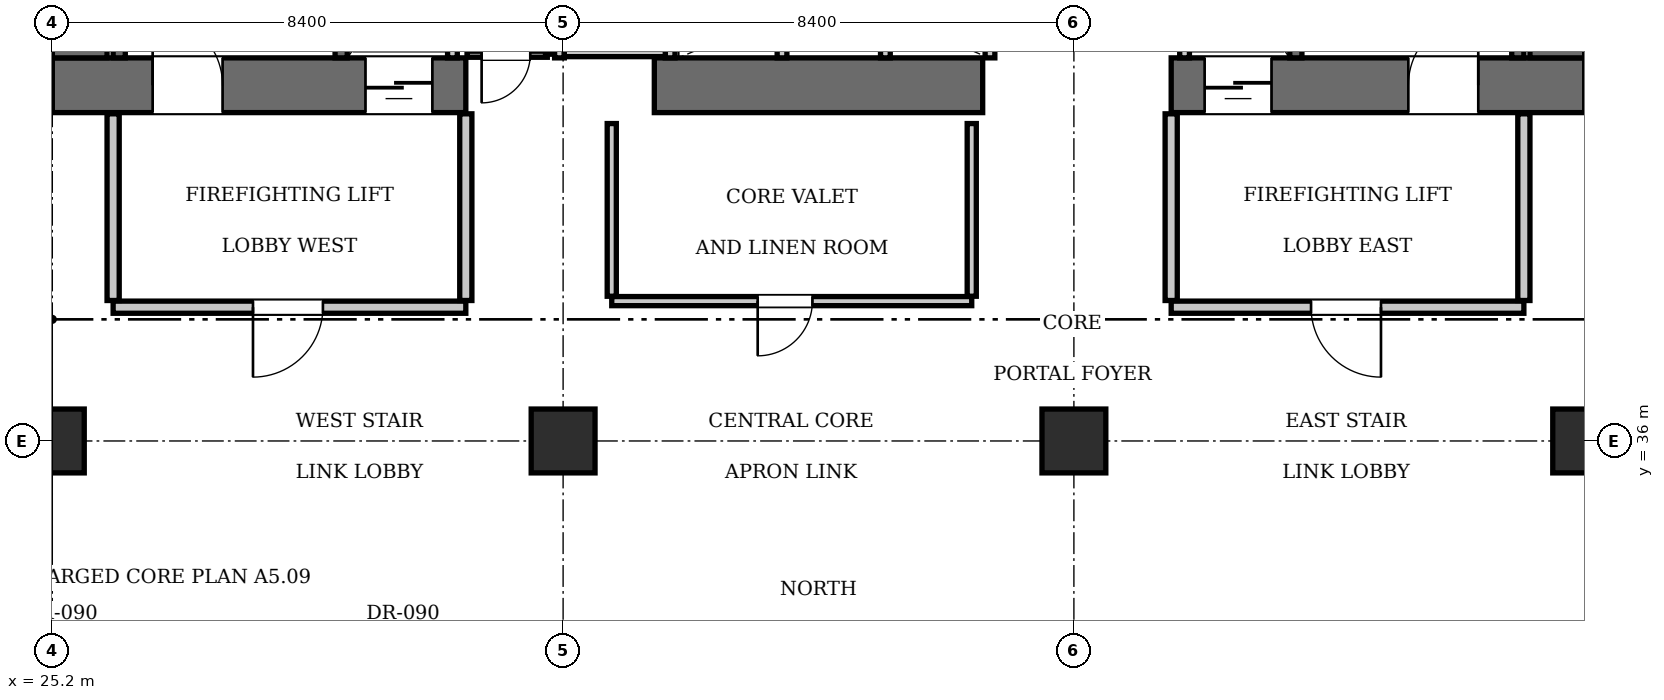
"""IFC4 building model, lengths in metres.
Left out: names, types, materials, properties, quantities, classifications, styles, units other than length and angle.
Written with IfcOpenShell. Run it as: python <this file> out.ifc"""

import sys

from ifc_helpers import new_model, si_unit, direction, frame, frame_2d, origin, origin_2d, place, context, subcontext, project, spatial, rectangle, extrude, element, fill, save


model = new_model("IFC4")
c1 = context("Model", 3, precision=1e-05, world=origin(), true_north=direction((0.0, 1.0)))
c2 = subcontext(c1, "Body", "Model", "MODEL_VIEW")
j1 = project(units=[si_unit("LENGTHUNIT", "METRE"), si_unit("PLANEANGLEUNIT", "RADIAN")], contexts=[c1])
p1 = place(None, origin())
s1 = spatial("IfcSite", under=j1, at=p1, CompositionType="ELEMENT")
p2 = place(p1, origin())
s2 = spatial("IfcBuilding", under=s1, at=p2, CompositionType="ELEMENT")
p3 = place(p2, frame((0.0, 0.0, 88.55)))
s3 = spatial("IfcBuildingStorey", under=s2, at=p3, CompositionType="ELEMENT", Elevation=88.55)
p4 = place(p3, frame((25.2, 41.85, 0.0), z_axis=(0.0, 0.0, 1.0), x_axis=(1.0, 0.0, 0.0)))
e1 = element("IfcWall", 1, at=p4, inside=s3, PredefinedType="SHEAR", context=c2, shape_type="SweptSolid", body=[
    extrude(rectangle(XDim=6.8, YDim=0.9, at=frame_2d((3.4, 0.0))), origin(), (0.0, 0.0, 1.0), 3.85),
])
p5 = place(p4, frame((1.65, 0.0, 0.0)))
e2 = element("IfcOpeningElement", 2, at=p5, cuts=e1, PredefinedType="OPENING", context=c2, shape_type="SweptSolid", body=[
    extrude(rectangle(XDim=1.15, YDim=2.15, at=frame_2d((0.575, 1.075))), frame((0.0, 0.46, 0.0), z_axis=(0.0, -1.0, 0.0), x_axis=(1.0, 0.0, 0.0)), (0.0, 0.0, 1.0), 0.92),
])
p6 = place(p4, frame((5.15, 0.0, 0.0)))
e3 = element("IfcOpeningElement", 3, at=p6, cuts=e1, PredefinedType="OPENING", context=c2, shape_type="SweptSolid", body=[
    extrude(rectangle(XDim=1.1, YDim=2.2, at=frame_2d((0.55, 1.1))), frame((0.0, 0.46, 0.0), z_axis=(0.0, -1.0, 0.0), x_axis=(1.0, 0.0, 0.0)), (0.0, 0.0, 1.0), 0.92),
])
p7 = place(p3, frame((35.1, 41.85, 0.0), z_axis=(0.0, 0.0, 1.0), x_axis=(1.0, 0.0, 0.0)))
e4 = element("IfcWall", 4, at=p7, inside=s3, PredefinedType="SHEAR", context=c2, shape_type="SweptSolid", body=[
    extrude(rectangle(XDim=5.4, YDim=0.9, at=frame_2d((2.7, 0.0))), origin(), (0.0, 0.0, 1.0), 3.85),
])
p8 = place(p3, frame((43.6, 41.85, 0.0), z_axis=(0.0, 0.0, 1.0), x_axis=(1.0, 0.0, 0.0)))
e5 = element("IfcWall", 5, at=p8, inside=s3, PredefinedType="SHEAR", context=c2, shape_type="SweptSolid", body=[
    extrude(rectangle(XDim=6.8, YDim=0.9, at=frame_2d((3.4, 0.0))), origin(), (0.0, 0.0, 1.0), 3.85),
])
p9 = place(p8, frame((3.9, 0.0, 0.0)))
e6 = element("IfcOpeningElement", 6, at=p9, cuts=e5, PredefinedType="OPENING", context=c2, shape_type="SweptSolid", body=[
    extrude(rectangle(XDim=1.15, YDim=2.15, at=frame_2d((0.575, 1.075))), frame((0.0, 0.46, 0.0), z_axis=(0.0, -1.0, 0.0), x_axis=(1.0, 0.0, 0.0)), (0.0, 0.0, 1.0), 0.92),
])
p10 = place(p8, frame((0.55, 0.0, 0.0)))
e7 = element("IfcOpeningElement", 7, at=p10, cuts=e5, PredefinedType="OPENING", context=c2, shape_type="SweptSolid", body=[
    extrude(rectangle(XDim=1.1, YDim=2.2, at=frame_2d((0.55, 1.1))), frame((0.0, 0.46, 0.0), z_axis=(0.0, -1.0, 0.0), x_axis=(1.0, 0.0, 0.0)), (0.0, 0.0, 1.0), 0.92),
])
for number, where, z_axis, x_axis in (
    (8, (25.65, 42.3, 0.0), (0.0, 0.0, 1.0), (0.0, 1.0, 0.0)),
    (9, (49.95, 42.3, 0.0), (0.0, 0.0, 1.0), (0.0, 1.0, 0.0)),
):
    element("IfcWall", number, at=place(p3, frame(where, z_axis=z_axis, x_axis=x_axis)), inside=s3, PredefinedType="SHEAR", context=c2, shape_type="SweptSolid", body=[
        extrude(rectangle(XDim=1.6, YDim=0.9, at=frame_2d((0.8, 0.0))), origin(), (0.0, 0.0, 1.0), 3.85),
    ])
for number, where, z_axis, x_axis in (
    (10, (25.2, 36.0, 0.0), (0.0, 0.0, 1.0), (1.0, 0.0, 0.0)),
    (11, (33.6, 36.0, 0.0), (0.0, 0.0, 1.0), (1.0, 0.0, 0.0)),
    (12, (42.0, 36.0, 0.0), (0.0, 0.0, 1.0), (1.0, 0.0, 0.0)),
    (13, (50.4, 36.0, 0.0), (0.0, 0.0, 1.0), (1.0, 0.0, 0.0)),
):
    element("IfcColumn", number, at=place(p3, frame(where, z_axis=z_axis, x_axis=x_axis)), inside=s3, PredefinedType="COLUMN", context=c2, shape_type="SweptSolid", body=[
        extrude(rectangle(XDim=1.05, YDim=1.05, at=origin_2d()), origin(), (0.0, 0.0, 1.0), 3.85),
    ])
p11 = place(p3, frame((29.95, 42.3, 0.0), z_axis=(0.0, 0.0, 1.0), x_axis=(0.0, 1.0, 0.0)))
e14 = element("IfcWall", 14, at=p11, inside=s3, PredefinedType="SOLIDWALL", context=c2, shape_type="SweptSolid", body=[
    extrude(rectangle(XDim=8.85, YDim=0.2, at=frame_2d((4.425, 0.0))), origin(), (0.0, 0.0, 1.0), 3.61),
])
p12 = place(p3, frame((26.3, 42.3, 0.0), z_axis=(0.0, 0.0, 1.0), x_axis=(0.0, 1.0, 0.0)))
e15 = element("IfcWall", 15, at=p12, inside=s3, PredefinedType="SOLIDWALL", context=c2, shape_type="SweptSolid", body=[
    extrude(rectangle(XDim=1.58, YDim=0.2, at=frame_2d((0.79, 0.0))), origin(), (0.0, 0.0, 1.0), 3.61),
])
p13 = place(p3, frame((45.65, 42.3, 0.0), z_axis=(0.0, 0.0, 1.0), x_axis=(0.0, 1.0, 0.0)))
e16 = element("IfcWall", 16, at=p13, inside=s3, PredefinedType="SOLIDWALL", context=c2, shape_type="SweptSolid", body=[
    extrude(rectangle(XDim=8.85, YDim=0.2, at=frame_2d((4.425, 0.0))), origin(), (0.0, 0.0, 1.0), 3.61),
])
p14 = place(p3, frame((49.3, 42.3, 0.0), z_axis=(0.0, 0.0, 1.0), x_axis=(0.0, 1.0, 0.0)))
e17 = element("IfcWall", 17, at=p14, inside=s3, PredefinedType="SOLIDWALL", context=c2, shape_type="SweptSolid", body=[
    extrude(rectangle(XDim=1.58, YDim=0.2, at=frame_2d((0.79, 0.0))), origin(), (0.0, 0.0, 1.0), 3.61),
])
for number, where, z_axis, x_axis in (
    (18, (31.78, 42.3, 0.0), (0.0, 0.0, 1.0), (0.0, 1.0, 0.0)),
    (19, (43.82, 42.3, 0.0), (0.0, 0.0, 1.0), (0.0, 1.0, 0.0)),
):
    element("IfcWall", number, at=place(p3, frame(where, z_axis=z_axis, x_axis=x_axis)), inside=s3, PredefinedType="SOLIDWALL", context=c2, shape_type="SweptSolid", body=[
        extrude(rectangle(XDim=2.44, YDim=0.16, at=frame_2d((1.22, 0.0))), origin(), (0.0, 0.0, 1.0), 3.61),
    ])
for number, where, z_axis, x_axis in (
    (20, (37.2, 42.3, 0.0), (0.0, 0.0, 1.0), (0.0, 1.0, 0.0)),
    (21, (38.9, 42.3, 0.0), (0.0, 0.0, 1.0), (0.0, 1.0, 0.0)),
    (22, (40.62, 42.3, 0.0), (0.0, 0.0, 1.0), (0.0, 1.0, 0.0)),
):
    element("IfcWall", number, at=place(p3, frame(where, z_axis=z_axis, x_axis=x_axis)), inside=s3, PredefinedType="SOLIDWALL", context=c2, shape_type="SweptSolid", body=[
        extrude(rectangle(XDim=2.05, YDim=0.16, at=frame_2d((1.025, 0.0))), origin(), (0.0, 0.0, 1.0), 3.61),
    ])
for number, where, z_axis, x_axis in (
    (23, (33.54, 42.3, 0.0), (0.0, 0.0, 1.0), (0.0, 1.0, 0.0)),
    (24, (35.36, 42.3, 0.0), (0.0, 0.0, 1.0), (0.0, 1.0, 0.0)),
):
    element("IfcWall", number, at=place(p3, frame(where, z_axis=z_axis, x_axis=x_axis)), inside=s3, PredefinedType="SOLIDWALL", context=c2, shape_type="SweptSolid", body=[
        extrude(rectangle(XDim=2.1, YDim=0.16, at=frame_2d((1.05, 0.0))), origin(), (0.0, 0.0, 1.0), 3.61),
    ])
p15 = place(p3, frame((33.62, 42.4, 0.0), z_axis=(0.0, 0.0, 1.0), x_axis=(1.0, 0.0, 0.0)))
e25 = element("IfcWall", 25, at=p15, inside=s3, PredefinedType="SOLIDWALL", context=c2, shape_type="SweptSolid", body=[
    extrude(rectangle(XDim=1.66, YDim=0.16, at=frame_2d((0.83, 0.0))), origin(), (0.0, 0.0, 1.0), 3.61),
])
p16 = place(p3, frame((26.2, 38.2, 0.0), z_axis=(0.0, 0.0, 1.0), x_axis=(1.0, 0.0, 0.0)))
e26 = element("IfcWall", 26, at=p16, inside=s3, PredefinedType="PARTITIONING", context=c2, shape_type="SweptSolid", body=[
    extrude(rectangle(XDim=5.8, YDim=0.2, at=frame_2d((2.9, 0.0))), origin(), (0.0, 0.0, 1.0), 3.61),
])
p17 = place(p16, frame((2.3, 0.0, 0.0)))
e27 = element("IfcOpeningElement", 27, at=p17, cuts=e26, PredefinedType="OPENING", context=c2, shape_type="SweptSolid", body=[
    extrude(rectangle(XDim=1.15, YDim=2.15, at=frame_2d((0.575, 1.075))), frame((0.0, 0.11, 0.0), z_axis=(0.0, -1.0, 0.0), x_axis=(1.0, 0.0, 0.0)), (0.0, 0.0, 1.0), 0.22),
])
for number, where, z_axis, x_axis in (
    (28, (26.2, 38.31, 0.0), (0.0, 0.0, 1.0), (0.0, 1.0, 0.0)),
    (29, (32.0, 38.31, 0.0), (0.0, 0.0, 1.0), (0.0, 1.0, 0.0)),
):
    element("IfcWall", number, at=place(p3, frame(where, z_axis=z_axis, x_axis=x_axis)), inside=s3, PredefinedType="PARTITIONING", context=c2, shape_type="SweptSolid", body=[
        extrude(rectangle(XDim=3.07, YDim=0.2, at=frame_2d((1.535, 0.0))), origin(), (0.0, 0.0, 1.0), 3.61),
    ])
p18 = place(p3, frame((43.6, 38.2, 0.0), z_axis=(0.0, 0.0, 1.0), x_axis=(1.0, 0.0, 0.0)))
e30 = element("IfcWall", 30, at=p18, inside=s3, PredefinedType="PARTITIONING", context=c2, shape_type="SweptSolid", body=[
    extrude(rectangle(XDim=5.8, YDim=0.2, at=frame_2d((2.9, 0.0))), origin(), (0.0, 0.0, 1.0), 3.61),
])
p19 = place(p18, frame((2.3, 0.0, 0.0)))
e31 = element("IfcOpeningElement", 31, at=p19, cuts=e30, PredefinedType="OPENING", context=c2, shape_type="SweptSolid", body=[
    extrude(rectangle(XDim=1.15, YDim=2.15, at=frame_2d((0.575, 1.075))), frame((0.0, 0.11, 0.0), z_axis=(0.0, -1.0, 0.0), x_axis=(1.0, 0.0, 0.0)), (0.0, 0.0, 1.0), 0.22),
])
for number, where, z_axis, x_axis in (
    (32, (43.6, 38.31, 0.0), (0.0, 0.0, 1.0), (0.0, 1.0, 0.0)),
    (33, (49.4, 38.31, 0.0), (0.0, 0.0, 1.0), (0.0, 1.0, 0.0)),
):
    element("IfcWall", number, at=place(p3, frame(where, z_axis=z_axis, x_axis=x_axis)), inside=s3, PredefinedType="PARTITIONING", context=c2, shape_type="SweptSolid", body=[
        extrude(rectangle(XDim=3.07, YDim=0.2, at=frame_2d((1.535, 0.0))), origin(), (0.0, 0.0, 1.0), 3.61),
    ])
p20 = place(p3, frame((32.02, 42.36, 0.0), z_axis=(0.0, 0.0, 1.0), x_axis=(1.0, 0.0, 0.0)))
e34 = element("IfcWall", 34, at=p20, inside=s3, PredefinedType="PARTITIONING", context=c2, shape_type="SweptSolid", body=[
    extrude(rectangle(XDim=1.32, YDim=0.1, at=frame_2d((0.66, 0.0))), origin(), (0.0, 0.0, 1.0), 3.61),
])
p21 = place(p20, frame((0.24, 0.0, 0.0)))
e35 = element("IfcOpeningElement", 35, at=p21, cuts=e34, PredefinedType="OPENING", context=c2, shape_type="SweptSolid", body=[
    extrude(rectangle(XDim=0.8, YDim=2.05, at=frame_2d((0.4, 1.025))), frame((0.0, 0.06, 0.0), z_axis=(0.0, -1.0, 0.0), x_axis=(1.0, 0.0, 0.0)), (0.0, 0.0, 1.0), 0.12),
])
p22 = place(p3, frame((33.36, 42.36, 0.0), z_axis=(0.0, 0.0, 1.0), x_axis=(0.0, 1.0, 0.0)))
e36 = element("IfcWall", 36, at=p22, inside=s3, PredefinedType="PARTITIONING", context=c2, shape_type="SweptSolid", body=[
    extrude(rectangle(XDim=2.58, YDim=0.1, at=frame_2d((1.29, 0.0))), origin(), (0.0, 0.0, 1.0), 3.61),
])
p23 = place(p3, frame((34.4, 38.3, 0.0), z_axis=(0.0, 0.0, 1.0), x_axis=(1.0, 0.0, 0.0)))
e37 = element("IfcWall", 37, at=p23, inside=s3, PredefinedType="PARTITIONING", context=c2, shape_type="SweptSolid", body=[
    extrude(rectangle(XDim=5.92, YDim=0.15, at=frame_2d((2.96, 0.0))), origin(), (0.0, 0.0, 1.0), 3.61),
])
p24 = place(p23, frame((2.4, 0.0, 0.0)))
e38 = element("IfcOpeningElement", 38, at=p24, cuts=e37, PredefinedType="OPENING", context=c2, shape_type="SweptSolid", body=[
    extrude(rectangle(XDim=0.9, YDim=2.1, at=frame_2d((0.45, 1.05))), frame((0.0, 0.085, 0.0), z_axis=(0.0, -1.0, 0.0), x_axis=(1.0, 0.0, 0.0)), (0.0, 0.0, 1.0), 0.17),
])
for number, where, z_axis, x_axis in (
    (39, (34.4, 38.38, 0.0), (0.0, 0.0, 1.0), (0.0, 1.0, 0.0)),
    (40, (40.32, 38.38, 0.0), (0.0, 0.0, 1.0), (0.0, 1.0, 0.0)),
):
    element("IfcWall", number, at=place(p3, frame(where, z_axis=z_axis, x_axis=x_axis)), inside=s3, PredefinedType="PARTITIONING", context=c2, shape_type="SweptSolid", body=[
        extrude(rectangle(XDim=2.84, YDim=0.15, at=frame_2d((1.42, 0.0))), origin(), (0.0, 0.0, 1.0), 3.61),
    ])
p25 = place(p5, origin())
e41 = element("IfcDoor", 41, at=p25, inside=s3, OperationType="SINGLE_SWING_LEFT", PredefinedType="DOOR", context=c2, shape_type="SweptSolid", body=[
    extrude(rectangle(XDim=1.15, YDim=2.15, at=frame_2d((0.575, 1.075))), frame((0.0, 0.025, 0.0), z_axis=(0.0, -1.0, 0.0), x_axis=(1.0, 0.0, 0.0)), (0.0, 0.0, 1.0), 0.05),
])
fill(e2, e41)
p26 = place(p9, origin())
e42 = element("IfcDoor", 42, at=p26, inside=s3, OperationType="SINGLE_SWING_RIGHT", PredefinedType="DOOR", context=c2, shape_type="SweptSolid", body=[
    extrude(rectangle(XDim=1.15, YDim=2.15, at=frame_2d((0.575, 1.075))), frame((0.0, 0.025, 0.0), z_axis=(0.0, -1.0, 0.0), x_axis=(1.0, 0.0, 0.0)), (0.0, 0.0, 1.0), 0.05),
])
fill(e6, e42)
p27 = place(p6, frame((1.1, 0.0, 0.0), z_axis=(0.0, 0.0, 1.0), x_axis=(-1.0, 0.0, 0.0)))
e43 = element("IfcDoor", 43, at=p27, inside=s3, OperationType="SLIDING_TO_LEFT", PredefinedType="DOOR", context=c2, shape_type="SweptSolid", body=[
    extrude(rectangle(XDim=1.1, YDim=2.2, at=frame_2d((0.55, 1.1))), frame((0.0, 0.025, 0.0), z_axis=(0.0, -1.0, 0.0), x_axis=(1.0, 0.0, 0.0)), (0.0, 0.0, 1.0), 0.05),
])
fill(e3, e43)
p28 = place(p10, frame((1.1, 0.0, 0.0), z_axis=(0.0, 0.0, 1.0), x_axis=(-1.0, 0.0, 0.0)))
e44 = element("IfcDoor", 44, at=p28, inside=s3, OperationType="SLIDING_TO_LEFT", PredefinedType="DOOR", context=c2, shape_type="SweptSolid", body=[
    extrude(rectangle(XDim=1.1, YDim=2.2, at=frame_2d((0.55, 1.1))), frame((0.0, 0.025, 0.0), z_axis=(0.0, -1.0, 0.0), x_axis=(1.0, 0.0, 0.0)), (0.0, 0.0, 1.0), 0.05),
])
fill(e7, e44)
p29 = place(p17, frame((1.15, 0.0, 0.0), z_axis=(0.0, 0.0, 1.0), x_axis=(-1.0, 0.0, 0.0)))
e45 = element("IfcDoor", 45, at=p29, inside=s3, OperationType="SINGLE_SWING_RIGHT", PredefinedType="DOOR", context=c2, shape_type="SweptSolid", body=[
    extrude(rectangle(XDim=1.15, YDim=2.15, at=frame_2d((0.575, 1.075))), frame((0.0, 0.025, 0.0), z_axis=(0.0, -1.0, 0.0), x_axis=(1.0, 0.0, 0.0)), (0.0, 0.0, 1.0), 0.05),
])
fill(e27, e45)
p30 = place(p19, frame((1.15, 0.0, 0.0), z_axis=(0.0, 0.0, 1.0), x_axis=(-1.0, 0.0, 0.0)))
e46 = element("IfcDoor", 46, at=p30, inside=s3, OperationType="SINGLE_SWING_LEFT", PredefinedType="DOOR", context=c2, shape_type="SweptSolid", body=[
    extrude(rectangle(XDim=1.15, YDim=2.15, at=frame_2d((0.575, 1.075))), frame((0.0, 0.025, 0.0), z_axis=(0.0, -1.0, 0.0), x_axis=(1.0, 0.0, 0.0)), (0.0, 0.0, 1.0), 0.05),
])
fill(e31, e46)
p31 = place(p21, frame((0.8, 0.0, 0.0), z_axis=(0.0, 0.0, 1.0), x_axis=(-1.0, 0.0, 0.0)))
e47 = element("IfcDoor", 47, at=p31, inside=s3, OperationType="SINGLE_SWING_RIGHT", PredefinedType="DOOR", context=c2, shape_type="SweptSolid", body=[
    extrude(rectangle(XDim=0.8, YDim=2.05, at=frame_2d((0.4, 1.025))), frame((0.0, 0.025, 0.0), z_axis=(0.0, -1.0, 0.0), x_axis=(1.0, 0.0, 0.0)), (0.0, 0.0, 1.0), 0.05),
])
fill(e35, e47)
p32 = place(p24, frame((0.9, 0.0, 0.0), z_axis=(0.0, 0.0, 1.0), x_axis=(-1.0, 0.0, 0.0)))
e48 = element("IfcDoor", 48, at=p32, inside=s3, OperationType="SINGLE_SWING_RIGHT", PredefinedType="DOOR", context=c2, shape_type="SweptSolid", body=[
    extrude(rectangle(XDim=0.9, YDim=2.1, at=frame_2d((0.45, 1.05))), frame((0.0, 0.025, 0.0), z_axis=(0.0, -1.0, 0.0), x_axis=(1.0, 0.0, 0.0)), (0.0, 0.0, 1.0), 0.05),
])
fill(e38, e48)
save(model, sys.argv[1])
